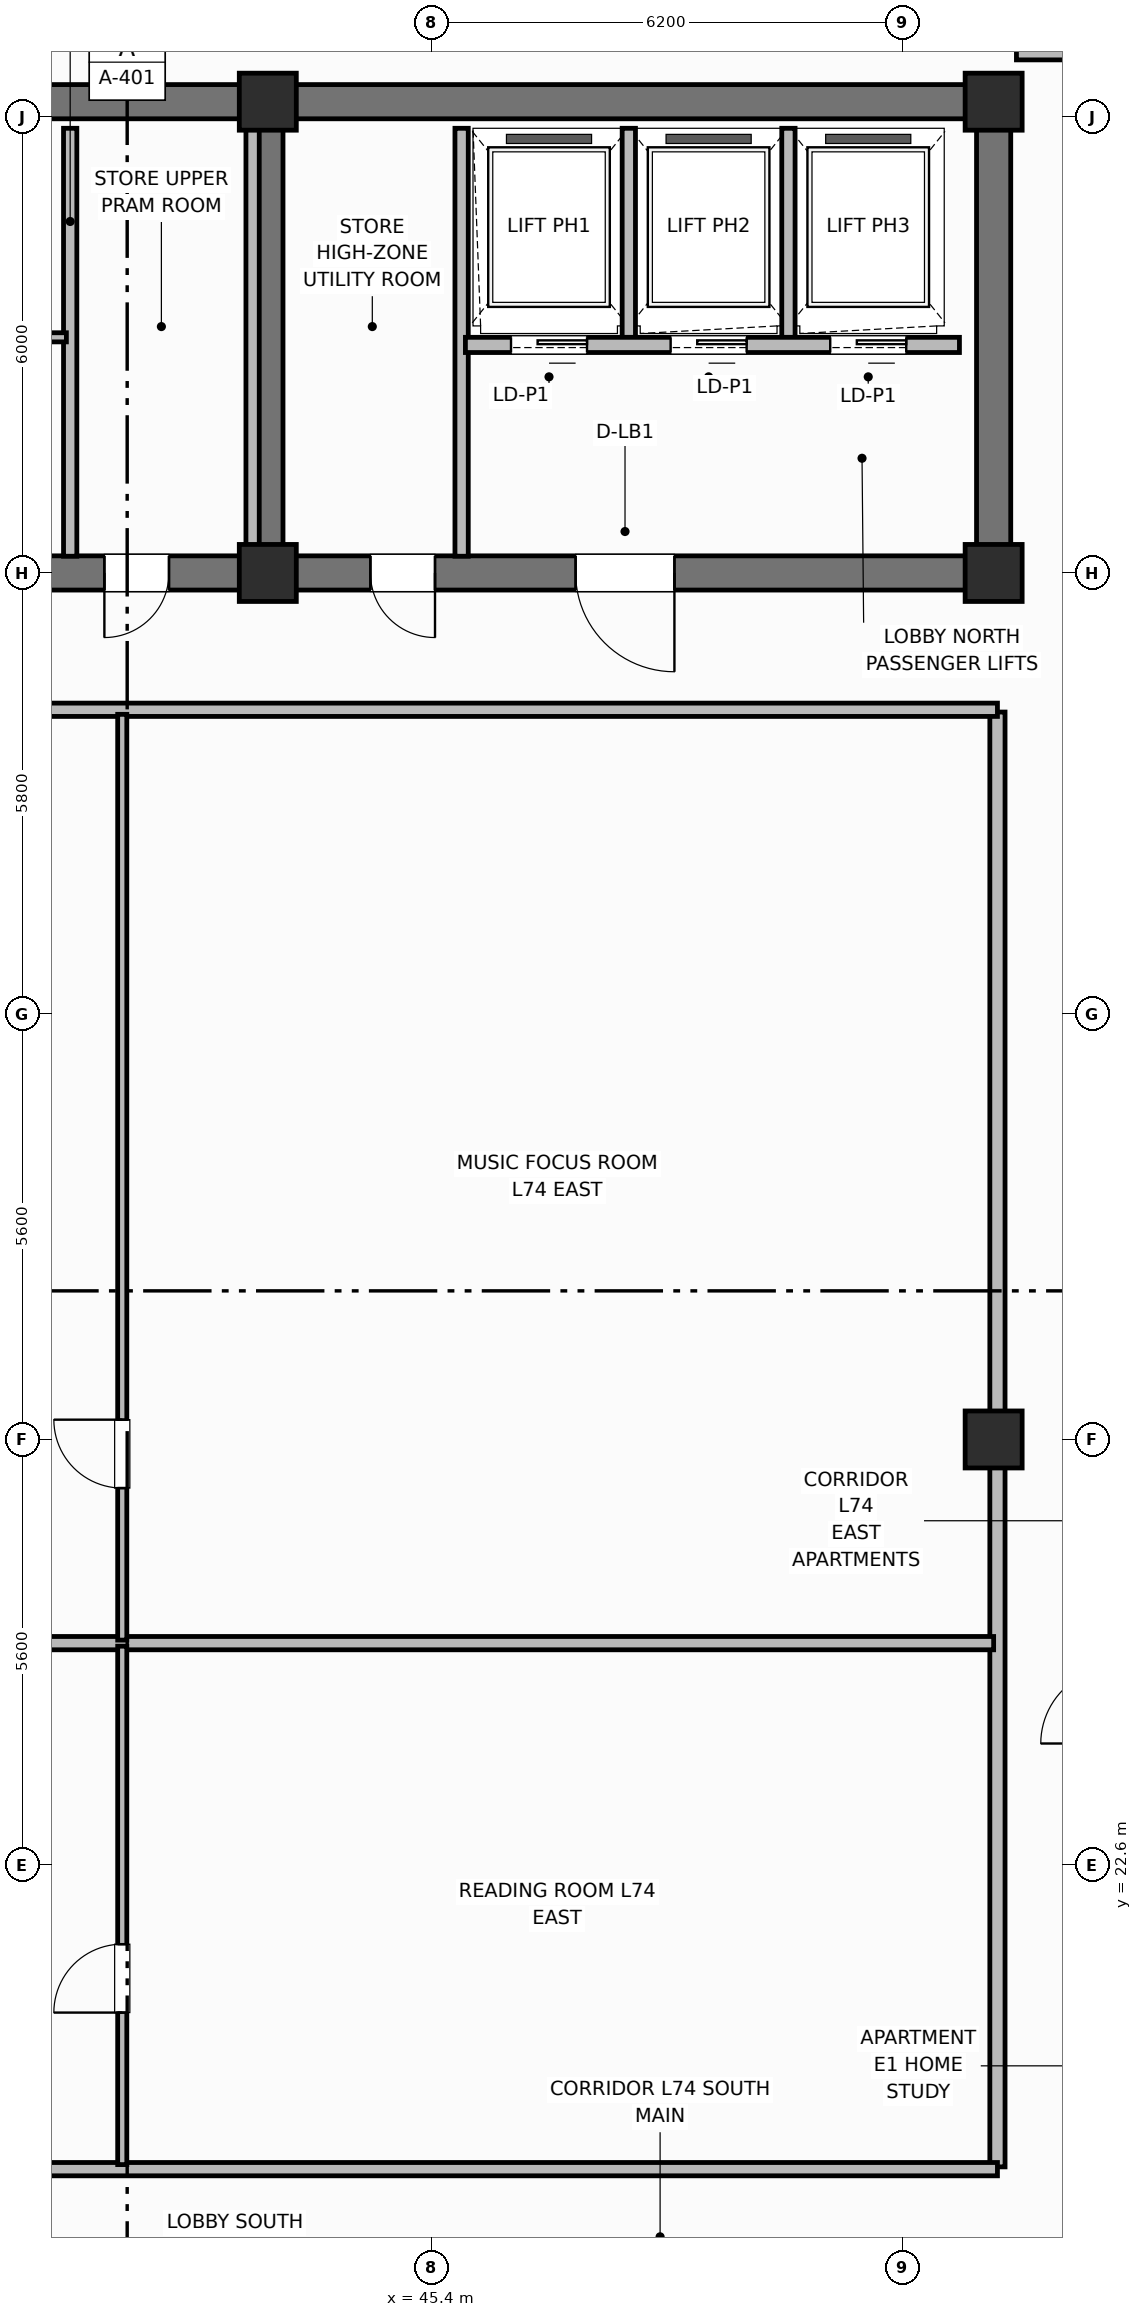
"""IFC4 building model, lengths in metres.
Left out: names, types, materials, properties, quantities, classifications, styles, units other than length and angle.
Written with IfcOpenShell. Run it as: python <this file> out.ifc"""

import sys

from ifc_helpers import new_model, si_unit, direction, frame, frame_2d, origin, origin_2d, place, context, subcontext, project, spatial, rectangle, extrude, element, fill, save


model = new_model("IFC4")
c1 = context("Model", 3, precision=1e-05, world=origin(), true_north=direction((0.0, 1.0)))
c2 = subcontext(c1, "Body", "Model", "MODEL_VIEW")
j1 = project(units=[si_unit("LENGTHUNIT", "METRE"), si_unit("PLANEANGLEUNIT", "RADIAN")], contexts=[c1])
p1 = place(None, origin())
s1 = spatial("IfcSite", under=j1, at=p1, CompositionType="ELEMENT")
p2 = place(p1, origin())
s2 = spatial("IfcBuilding", under=s1, at=p2, CompositionType="ELEMENT")
p3 = place(p2, frame((0.0, 0.0, 293.5)))
s3 = spatial("IfcBuildingStorey", under=s2, at=p3, CompositionType="ELEMENT", Elevation=293.5)
p4 = place(p3, frame((25.6, 45.8, 0.0), z_axis=(0.0, 0.0, 1.0), x_axis=(1.0, 0.0, 0.0)))
e1 = element("IfcWall", 1, at=p4, inside=s3, PredefinedType="SHEAR", context=c2, shape_type="SweptSolid", body=[
    extrude(rectangle(XDim=27.2, YDim=0.45, at=frame_2d((13.6, 0.0))), origin(), (0.0, 0.0, 1.0), 3.7),
])
p5 = place(p3, frame((52.8, 39.825, 0.0), z_axis=(0.0, 0.0, 1.0), x_axis=(0.0, 1.0, 0.0)))
e2 = element("IfcWall", 2, at=p5, inside=s3, PredefinedType="SHEAR", context=c2, shape_type="SweptSolid", body=[
    extrude(rectangle(XDim=5.75, YDim=0.45, at=frame_2d((2.875, 0.0))), origin(), (0.0, 0.0, 1.0), 3.7),
])
p6 = place(p3, frame((52.8, 39.6, 0.0), z_axis=(0.0, 0.0, 1.0), x_axis=(-1.0, 0.0, 0.0)))
e3 = element("IfcWall", 3, at=p6, inside=s3, PredefinedType="SHEAR", context=c2, shape_type="SweptSolid", body=[
    extrude(rectangle(XDim=27.2, YDim=0.45, at=frame_2d((13.6, 0.0))), origin(), (0.0, 0.0, 1.0), 3.7),
])
p7 = place(p6, frame((24.3, 0.0, 0.0)))
e4 = element("IfcOpeningElement", 4, at=p7, cuts=e3, PredefinedType="OPENING", context=c2, shape_type="SweptSolid", body=[
    extrude(rectangle(XDim=1.1, YDim=2.15, at=frame_2d((0.55, 1.075))), frame((0.0, 0.235, 0.0), z_axis=(0.0, -1.0, 0.0), x_axis=(1.0, 0.0, 0.0)), (0.0, 0.0, 1.0), 0.47),
])
p8 = place(p6, frame((21.85, 0.0, 0.0)))
e5 = element("IfcOpeningElement", 5, at=p8, cuts=e3, PredefinedType="OPENING", context=c2, shape_type="SweptSolid", body=[
    extrude(rectangle(XDim=0.85, YDim=2.1, at=frame_2d((0.425, 1.05))), frame((0.0, 0.235, 0.0), z_axis=(0.0, -1.0, 0.0), x_axis=(1.0, 0.0, 0.0)), (0.0, 0.0, 1.0), 0.47),
])
p9 = place(p6, frame((19.85, 0.0, 0.0)))
e6 = element("IfcOpeningElement", 6, at=p9, cuts=e3, PredefinedType="OPENING", context=c2, shape_type="SweptSolid", body=[
    extrude(rectangle(XDim=0.85, YDim=2.1, at=frame_2d((0.425, 1.05))), frame((0.0, 0.235, 0.0), z_axis=(0.0, -1.0, 0.0), x_axis=(1.0, 0.0, 0.0)), (0.0, 0.0, 1.0), 0.47),
])
p10 = place(p6, frame((15.1, 0.0, 0.0)))
e7 = element("IfcOpeningElement", 7, at=p10, cuts=e3, PredefinedType="OPENING", context=c2, shape_type="SweptSolid", body=[
    extrude(rectangle(XDim=1.2, YDim=2.15, at=frame_2d((0.6, 1.075))), frame((0.0, 0.235, 0.0), z_axis=(0.0, -1.0, 0.0), x_axis=(1.0, 0.0, 0.0)), (0.0, 0.0, 1.0), 0.47),
])
p11 = place(p6, frame((12.6, 0.0, 0.0)))
e8 = element("IfcOpeningElement", 8, at=p11, cuts=e3, PredefinedType="OPENING", context=c2, shape_type="SweptSolid", body=[
    extrude(rectangle(XDim=0.85, YDim=2.1, at=frame_2d((0.425, 1.05))), frame((0.0, 0.235, 0.0), z_axis=(0.0, -1.0, 0.0), x_axis=(1.0, 0.0, 0.0)), (0.0, 0.0, 1.0), 0.47),
])
p12 = place(p6, frame((10.85, 0.0, 0.0)))
e9 = element("IfcOpeningElement", 9, at=p12, cuts=e3, PredefinedType="OPENING", context=c2, shape_type="SweptSolid", body=[
    extrude(rectangle(XDim=0.85, YDim=2.1, at=frame_2d((0.425, 1.05))), frame((0.0, 0.235, 0.0), z_axis=(0.0, -1.0, 0.0), x_axis=(1.0, 0.0, 0.0)), (0.0, 0.0, 1.0), 0.47),
])
p13 = place(p6, frame((7.35, 0.0, 0.0)))
e10 = element("IfcOpeningElement", 10, at=p13, cuts=e3, PredefinedType="OPENING", context=c2, shape_type="SweptSolid", body=[
    extrude(rectangle(XDim=0.85, YDim=2.1, at=frame_2d((0.425, 1.05))), frame((0.0, 0.235, 0.0), z_axis=(0.0, -1.0, 0.0), x_axis=(1.0, 0.0, 0.0)), (0.0, 0.0, 1.0), 0.47),
])
p14 = place(p6, frame((4.2, 0.0, 0.0)))
e11 = element("IfcOpeningElement", 11, at=p14, cuts=e3, PredefinedType="OPENING", context=c2, shape_type="SweptSolid", body=[
    extrude(rectangle(XDim=1.3, YDim=2.2, at=frame_2d((0.65, 1.1))), frame((0.0, 0.235, 0.0), z_axis=(0.0, -1.0, 0.0), x_axis=(1.0, 0.0, 0.0)), (0.0, 0.0, 1.0), 0.47),
])
p15 = place(p3, frame((43.25, 39.825, 0.0), z_axis=(0.0, 0.0, 1.0), x_axis=(0.0, 1.0, 0.0)))
e12 = element("IfcWall", 12, at=p15, inside=s3, PredefinedType="SHEAR", context=c2, shape_type="SweptSolid", body=[
    extrude(rectangle(XDim=5.75, YDim=0.4, at=frame_2d((2.875, 0.0))), origin(), (0.0, 0.0, 1.0), 3.7),
])
for number, where, z_axis, x_axis in (
    (13, (43.25, 39.6, 0.0), (0.0, 0.0, 1.0), (1.0, 0.0, 0.0)),
    (14, (43.25, 45.8, 0.0), (0.0, 0.0, 1.0), (1.0, 0.0, 0.0)),
    (15, (52.8, 39.6, 0.0), (0.0, 0.0, 1.0), (1.0, 0.0, 0.0)),
    (16, (52.8, 45.8, 0.0), (0.0, 0.0, 1.0), (1.0, 0.0, 0.0)),
    (17, (52.8, 28.2, 0.0), (0.0, 0.0, 1.0), (1.0, 0.0, 0.0)),
):
    element("IfcColumn", number, at=place(p3, frame(where, z_axis=z_axis, x_axis=x_axis)), inside=s3, PredefinedType="COLUMN", context=c2, shape_type="SweptSolid", body=[
        extrude(rectangle(XDim=0.75, YDim=0.75, at=origin_2d()), origin(), (0.0, 0.0, 1.0), 3.7),
    ])
for number, where, z_axis, x_axis in (
    (18, (43.05, 39.82, 0.0), (0.0, 0.0, 1.0), (0.0, 1.0, 0.0)),
    (19, (40.65, 39.82, 0.0), (0.0, 0.0, 1.0), (0.0, 1.0, 0.0)),
):
    element("IfcWall", number, at=place(p3, frame(where, z_axis=z_axis, x_axis=x_axis)), inside=s3, PredefinedType="PARTITIONING", context=c2, shape_type="SweptSolid", body=[
        extrude(rectangle(XDim=5.63, YDim=0.175, at=frame_2d((2.815, 0.0))), origin(), (0.0, 0.0, 1.0), 2.54),
    ])
p16 = place(p3, frame((38.4, 42.7, 0.0), z_axis=(0.0, 0.0, 1.0), x_axis=(1.0, 0.0, 0.0)))
e20 = element("IfcWall", 20, at=p16, inside=s3, PredefinedType="PARTITIONING", context=c2, shape_type="SweptSolid", body=[
    extrude(rectangle(XDim=2.2, YDim=0.12, at=frame_2d((1.1, 0.0))), origin(), (0.0, 0.0, 1.0), 2.31),
])
p17 = place(p16, frame((0.65, 0.0, 0.0)))
e21 = element("IfcOpeningElement", 21, at=p17, cuts=e20, PredefinedType="OPENING", context=c2, shape_type="SweptSolid", body=[
    extrude(rectangle(XDim=0.85, YDim=2.1, at=frame_2d((0.425, 1.05))), frame((0.0, 0.07, 0.0), z_axis=(0.0, -1.0, 0.0), x_axis=(1.0, 0.0, 0.0)), (0.0, 0.0, 1.0), 0.14),
])
p18 = place(p3, frame((45.8, 39.82, 0.0), z_axis=(0.0, 0.0, 1.0), x_axis=(0.0, 1.0, 0.0)))
e22 = element("IfcWall", 22, at=p18, inside=s3, PredefinedType="PARTITIONING", context=c2, shape_type="SweptSolid", body=[
    extrude(rectangle(XDim=5.63, YDim=0.175, at=frame_2d((2.815, 0.0))), origin(), (0.0, 0.0, 1.0), 2.54),
])
for number, where, z_axis, x_axis in (
    (23, (48.0, 42.65, 0.0), (0.0, 0.0, 1.0), (0.0, 1.0, 0.0)),
    (24, (50.1, 42.65, 0.0), (0.0, 0.0, 1.0), (0.0, 1.0, 0.0)),
):
    element("IfcWall", number, at=place(p3, frame(where, z_axis=z_axis, x_axis=x_axis)), inside=s3, PredefinedType="PARTITIONING", context=c2, shape_type="SweptSolid", body=[
        extrude(rectangle(XDim=2.8, YDim=0.175, at=frame_2d((1.4, 0.0))), origin(), (0.0, 0.0, 1.0), 2.54),
    ])
p19 = place(p3, frame((52.35, 42.6, 0.0), z_axis=(0.0, 0.0, 1.0), x_axis=(-1.0, 0.0, 0.0)))
e25 = element("IfcWall", 25, at=p19, inside=s3, PredefinedType="PARTITIONING", context=c2, shape_type="SweptSolid", body=[
    extrude(rectangle(XDim=6.5, YDim=0.2, at=frame_2d((3.25, 0.0))), origin(), (0.0, 0.0, 1.0), 2.54),
])
p20 = place(p19, frame((4.9, 0.0, 0.0)))
e26 = element("IfcOpeningElement", 26, at=p20, cuts=e25, PredefinedType="OPENING", context=c2, shape_type="SweptSolid", body=[
    extrude(rectangle(XDim=1.0, YDim=2.15, at=frame_2d((0.5, 1.075))), frame((0.0, 0.11, 0.0), z_axis=(0.0, -1.0, 0.0), x_axis=(1.0, 0.0, 0.0)), (0.0, 0.0, 1.0), 0.22),
])
p21 = place(p19, frame((2.8, 0.0, 0.0)))
e27 = element("IfcOpeningElement", 27, at=p21, cuts=e25, PredefinedType="OPENING", context=c2, shape_type="SweptSolid", body=[
    extrude(rectangle(XDim=1.0, YDim=2.15, at=frame_2d((0.5, 1.075))), frame((0.0, 0.11, 0.0), z_axis=(0.0, -1.0, 0.0), x_axis=(1.0, 0.0, 0.0)), (0.0, 0.0, 1.0), 0.22),
])
p22 = place(p19, frame((0.7, 0.0, 0.0)))
e28 = element("IfcOpeningElement", 28, at=p22, cuts=e25, PredefinedType="OPENING", context=c2, shape_type="SweptSolid", body=[
    extrude(rectangle(XDim=1.0, YDim=2.15, at=frame_2d((0.5, 1.075))), frame((0.0, 0.11, 0.0), z_axis=(0.0, -1.0, 0.0), x_axis=(1.0, 0.0, 0.0)), (0.0, 0.0, 1.0), 0.22),
])
p23 = place(p3, frame((52.85, 18.63, 0.0), z_axis=(0.0, 0.0, 1.0), x_axis=(0.0, 1.0, 0.0)))
e29 = element("IfcWall", 29, at=p23, inside=s3, PredefinedType="PARTITIONING", context=c2, shape_type="SweptSolid", body=[
    extrude(rectangle(XDim=19.14, YDim=0.2, at=frame_2d((9.57, 0.0))), origin(), (0.0, 0.0, 1.0), 2.54),
])
for number, where, z_axis, x_axis in (
    (30, (29.9, 18.6, 0.0), (0.0, 0.0, 1.0), (1.0, 0.0, 0.0)),
    (31, (29.9, 37.8, 0.0), (0.0, 0.0, 1.0), (1.0, 0.0, 0.0)),
):
    element("IfcWall", number, at=place(p3, frame(where, z_axis=z_axis, x_axis=x_axis)), inside=s3, PredefinedType="PARTITIONING", context=c2, shape_type="SweptSolid", body=[
        extrude(rectangle(XDim=22.95, YDim=0.175, at=frame_2d((11.475, 0.0))), origin(), (0.0, 0.0, 1.0), 2.54),
    ])
p24 = place(p3, frame((29.93, 25.521, 0.0), z_axis=(0.0, 0.0, 1.0), x_axis=(1.0, 0.0, 0.0)))
e32 = element("IfcWall", 32, at=p24, inside=s3, PredefinedType="PARTITIONING", context=c2, shape_type="SweptSolid", body=[
    extrude(rectangle(XDim=22.87, YDim=0.175, at=frame_2d((11.435, 0.0))), origin(), (0.0, 0.0, 1.0), 2.54),
])
p25 = place(p3, frame((41.335, 18.66, 0.0), z_axis=(0.0, 0.0, 1.0), x_axis=(0.0, 1.0, 0.0)))
e33 = element("IfcWall", 33, at=p25, inside=s3, PredefinedType="PARTITIONING", context=c2, shape_type="SweptSolid", body=[
    extrude(rectangle(XDim=6.821, YDim=0.12, at=frame_2d((3.41, 0.0))), origin(), (0.0, 0.0, 1.0), 2.54),
])
p26 = place(p25, frame((2.0, 0.0, 0.0)))
e34 = element("IfcOpeningElement", 34, at=p26, cuts=e33, PredefinedType="OPENING", context=c2, shape_type="SweptSolid", body=[
    extrude(rectangle(XDim=0.9, YDim=2.1, at=frame_2d((0.45, 1.05))), frame((0.0, 0.07, 0.0), z_axis=(0.0, -1.0, 0.0), x_axis=(1.0, 0.0, 0.0)), (0.0, 0.0, 1.0), 0.14),
])
p27 = place(p3, frame((41.335, 25.56, 0.0), z_axis=(0.0, 0.0, 1.0), x_axis=(0.0, 1.0, 0.0)))
e35 = element("IfcWall", 35, at=p27, inside=s3, PredefinedType="PARTITIONING", context=c2, shape_type="SweptSolid", body=[
    extrude(rectangle(XDim=12.18, YDim=0.12, at=frame_2d((6.09, 0.0))), origin(), (0.0, 0.0, 1.0), 2.54),
])
p28 = place(p27, frame((2.0, 0.0, 0.0)))
e36 = element("IfcOpeningElement", 36, at=p28, cuts=e35, PredefinedType="OPENING", context=c2, shape_type="SweptSolid", body=[
    extrude(rectangle(XDim=0.9, YDim=2.1, at=frame_2d((0.45, 1.05))), frame((0.0, 0.07, 0.0), z_axis=(0.0, -1.0, 0.0), x_axis=(1.0, 0.0, 0.0)), (0.0, 0.0, 1.0), 0.14),
])
p29 = place(p3, frame((53.1, 46.45, 0.0), z_axis=(0.0, 0.0, 1.0), x_axis=(1.0, 0.0, 0.0)))
e37 = element("IfcWall", 37, at=p29, inside=s3, PredefinedType="PARTITIONING", context=c2, shape_type="SweptSolid", body=[
    extrude(rectangle(XDim=3.754, YDim=0.2, at=frame_2d((1.877, 0.0))), origin(), (0.0, 0.0, 1.0), 2.54),
])
p30 = place(p20, origin())
e38 = element("IfcDoor", 38, at=p30, inside=s3, OperationType="SLIDING_TO_LEFT", PredefinedType="DOOR", context=c2, shape_type="SweptSolid", body=[
    extrude(rectangle(XDim=1.0, YDim=2.15, at=frame_2d((0.5, 1.075))), frame((0.0, 0.025, 0.0), z_axis=(0.0, -1.0, 0.0), x_axis=(1.0, 0.0, 0.0)), (0.0, 0.0, 1.0), 0.05),
])
fill(e26, e38)
p31 = place(p21, origin())
e39 = element("IfcDoor", 39, at=p31, inside=s3, OperationType="SLIDING_TO_LEFT", PredefinedType="DOOR", context=c2, shape_type="SweptSolid", body=[
    extrude(rectangle(XDim=1.0, YDim=2.15, at=frame_2d((0.5, 1.075))), frame((0.0, 0.025, 0.0), z_axis=(0.0, -1.0, 0.0), x_axis=(1.0, 0.0, 0.0)), (0.0, 0.0, 1.0), 0.05),
])
fill(e27, e39)
p32 = place(p22, origin())
e40 = element("IfcDoor", 40, at=p32, inside=s3, OperationType="SLIDING_TO_LEFT", PredefinedType="DOOR", context=c2, shape_type="SweptSolid", body=[
    extrude(rectangle(XDim=1.0, YDim=2.15, at=frame_2d((0.5, 1.075))), frame((0.0, 0.025, 0.0), z_axis=(0.0, -1.0, 0.0), x_axis=(1.0, 0.0, 0.0)), (0.0, 0.0, 1.0), 0.05),
])
fill(e28, e40)
p33 = place(p26, origin())
e41 = element("IfcDoor", 41, at=p33, inside=s3, OperationType="SINGLE_SWING_LEFT", PredefinedType="DOOR", context=c2, shape_type="SweptSolid", body=[
    extrude(rectangle(XDim=0.9, YDim=2.1, at=frame_2d((0.45, 1.05))), frame((0.0, 0.025, 0.0), z_axis=(0.0, -1.0, 0.0), x_axis=(1.0, 0.0, 0.0)), (0.0, 0.0, 1.0), 0.05),
])
fill(e34, e41)
p34 = place(p28, origin())
e42 = element("IfcDoor", 42, at=p34, inside=s3, OperationType="SINGLE_SWING_RIGHT", PredefinedType="DOOR", context=c2, shape_type="SweptSolid", body=[
    extrude(rectangle(XDim=0.9, YDim=2.1, at=frame_2d((0.45, 1.05))), frame((0.0, 0.025, 0.0), z_axis=(0.0, -1.0, 0.0), x_axis=(1.0, 0.0, 0.0)), (0.0, 0.0, 1.0), 0.05),
])
fill(e36, e42)
p35 = place(p12, origin())
e43 = element("IfcDoor", 43, at=p35, inside=s3, OperationType="SINGLE_SWING_RIGHT", PredefinedType="DOOR", context=c2, shape_type="SweptSolid", body=[
    extrude(rectangle(XDim=0.85, YDim=2.1, at=frame_2d((0.425, 1.05))), frame((0.0, 0.025, 0.0), z_axis=(0.0, -1.0, 0.0), x_axis=(1.0, 0.0, 0.0)), (0.0, 0.0, 1.0), 0.05),
])
fill(e9, e43)
p36 = place(p13, origin())
e44 = element("IfcDoor", 44, at=p36, inside=s3, OperationType="SINGLE_SWING_LEFT", PredefinedType="DOOR", context=c2, shape_type="SweptSolid", body=[
    extrude(rectangle(XDim=0.85, YDim=2.1, at=frame_2d((0.425, 1.05))), frame((0.0, 0.025, 0.0), z_axis=(0.0, -1.0, 0.0), x_axis=(1.0, 0.0, 0.0)), (0.0, 0.0, 1.0), 0.05),
])
fill(e10, e44)
p37 = place(p14, origin())
e45 = element("IfcDoor", 45, at=p37, inside=s3, OperationType="SINGLE_SWING_LEFT", PredefinedType="DOOR", context=c2, shape_type="SweptSolid", body=[
    extrude(rectangle(XDim=1.3, YDim=2.2, at=frame_2d((0.65, 1.1))), frame((0.0, 0.025, 0.0), z_axis=(0.0, -1.0, 0.0), x_axis=(1.0, 0.0, 0.0)), (0.0, 0.0, 1.0), 0.05),
])
fill(e11, e45)
save(model, sys.argv[1])
